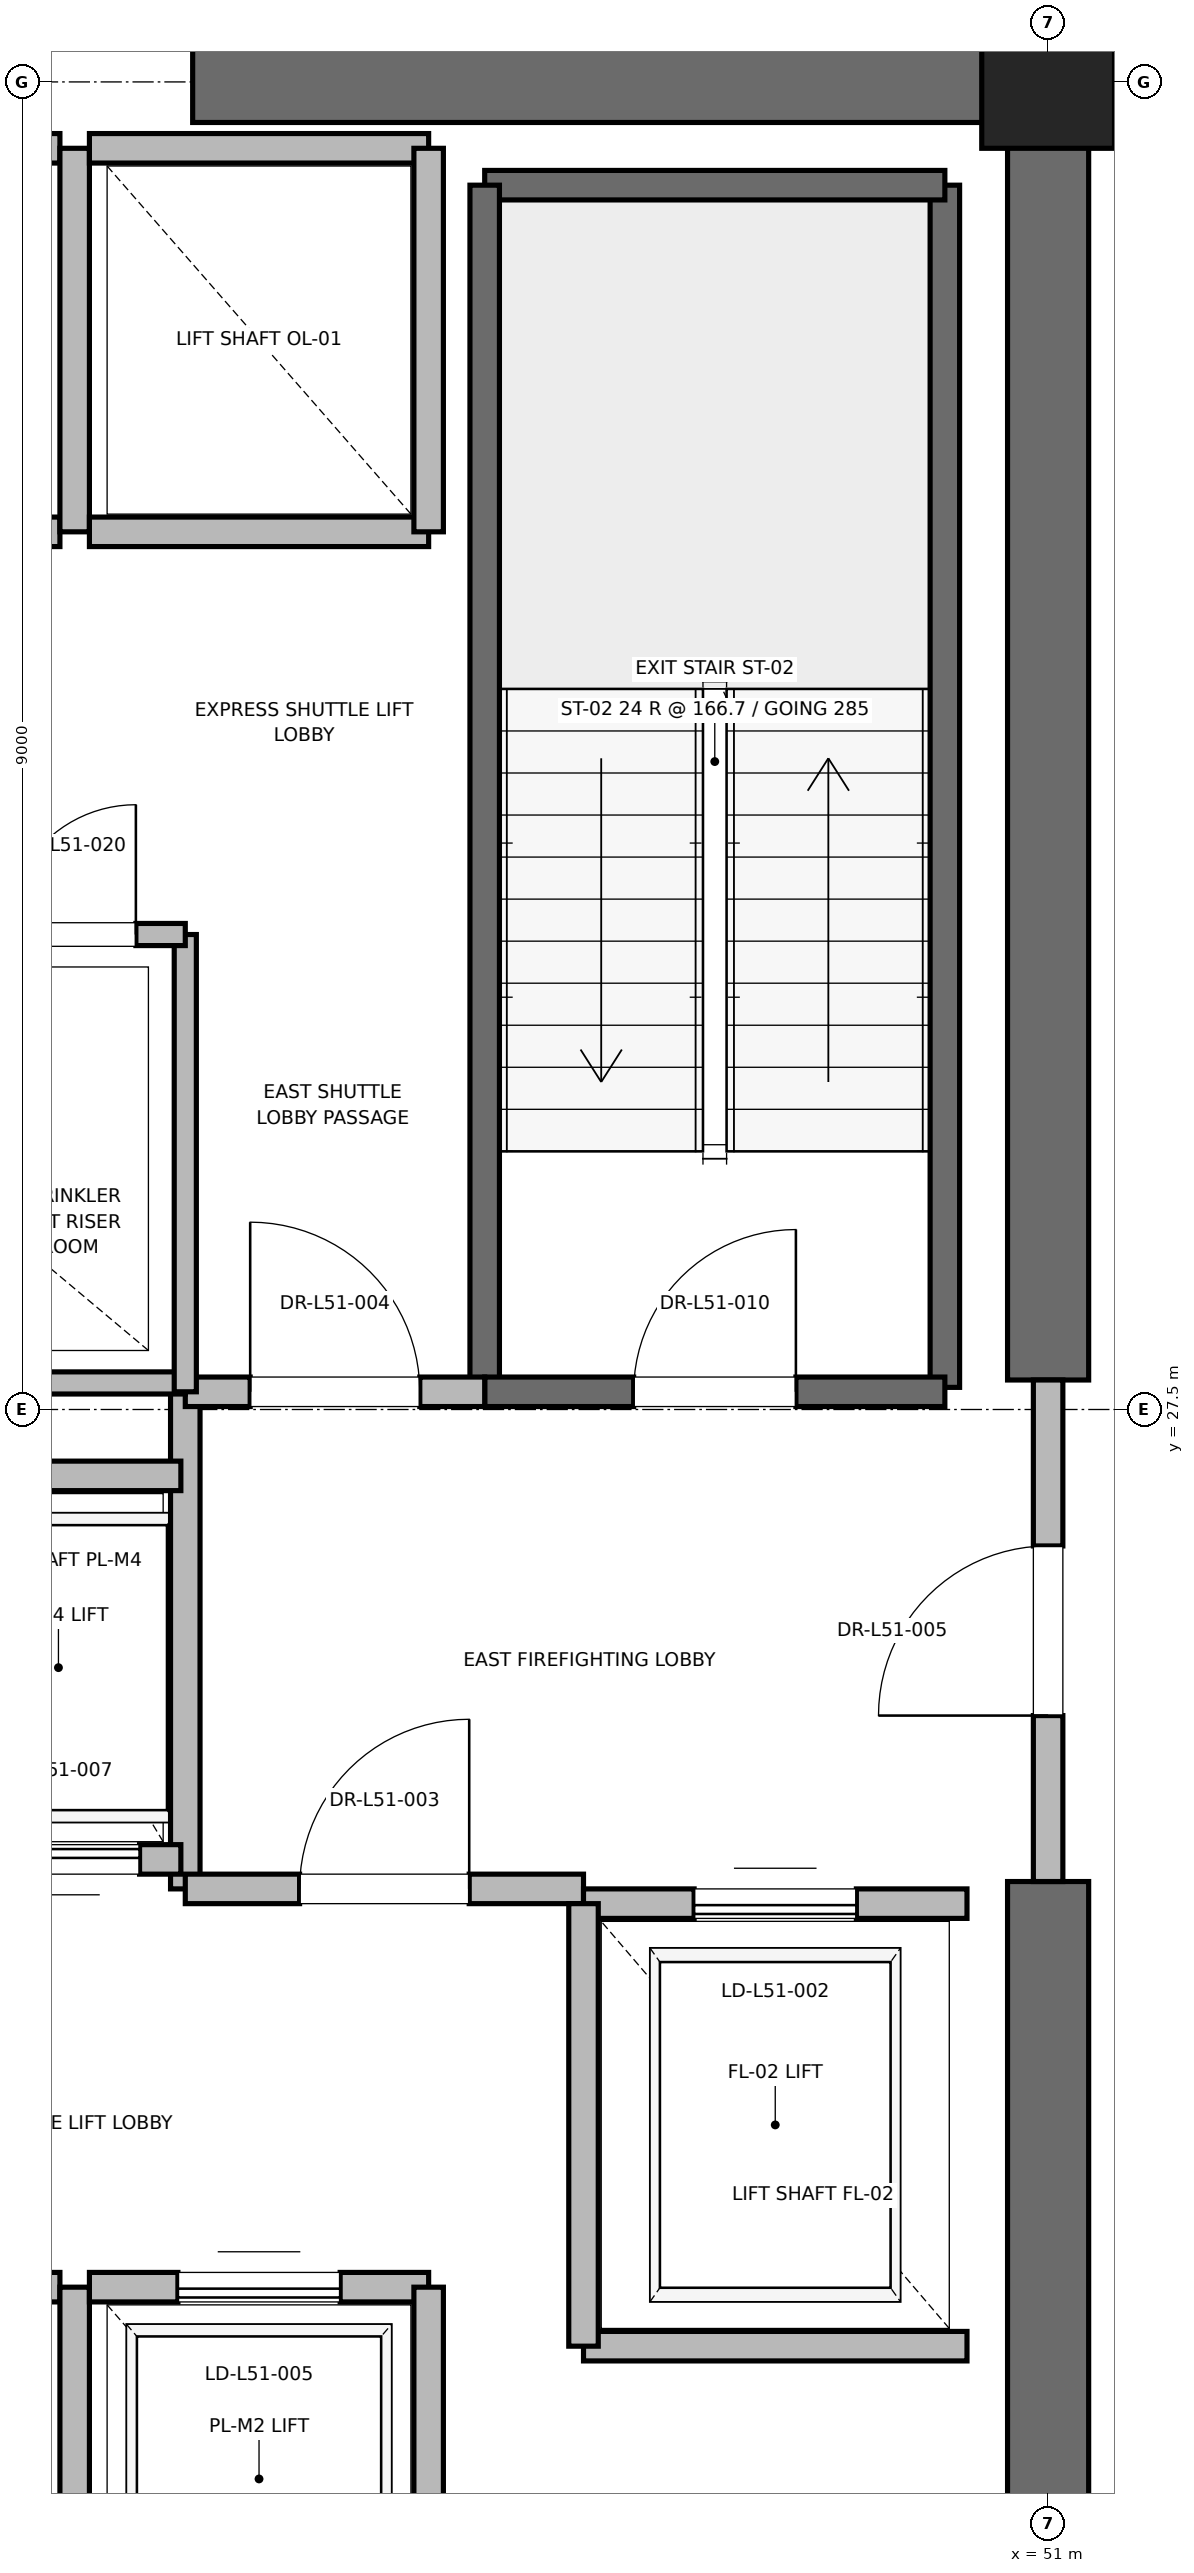
"""IFC4 building model, lengths in metres.
Left out: names, types, materials, properties, quantities, classifications, styles, units other than length and angle.
Written with IfcOpenShell. Run it as: python <this file> out.ifc"""

import sys

from ifc_helpers import new_model, si_unit, direction, frame, frame_2d, origin, origin_2d, place, context, subcontext, project, spatial, rectangle, extrude, element, fill, save


model = new_model("IFC4")
c1 = context("Model", 3, precision=1e-05, world=origin(), true_north=direction((0.0, 1.0)))
c2 = subcontext(c1, "Body", "Model", "MODEL_VIEW")
j1 = project(units=[si_unit("LENGTHUNIT", "METRE"), si_unit("PLANEANGLEUNIT", "RADIAN")], contexts=[c1])
p1 = place(None, origin())
s1 = spatial("IfcSite", under=j1, at=p1, CompositionType="ELEMENT")
p2 = place(p1, origin())
s2 = spatial("IfcBuilding", under=s1, at=p2, CompositionType="ELEMENT")
p3 = place(p2, frame((0.0, 0.0, 221.2)))
s3 = spatial("IfcBuildingStorey", under=s2, at=p3, CompositionType="ELEMENT", Elevation=221.2)
p4 = place(p3, frame((51.0, 36.5, 0.0), z_axis=(0.0, 0.0, 1.0), x_axis=(1.0, 0.0, 0.0)))
e1 = element("IfcColumn", 1, at=p4, inside=s3, PredefinedType="PILASTER", context=c2, shape_type="SweptSolid", body=[
    extrude(rectangle(XDim=0.9, YDim=0.9, at=origin_2d()), origin(), (0.0, 0.0, 1.0), 4.0),
])
for number, where, z_axis, x_axis in (
    (2, (45.2, 36.5, 0.0), (0.0, 0.0, 1.0), (1.0, 0.0, 0.0)),
    (3, (51.0, 18.5, 0.0), (0.0, 0.0, 1.0), (0.0, 1.0, 0.0)),
):
    element("IfcWall", number, at=place(p3, frame(where, z_axis=z_axis, x_axis=x_axis)), inside=s3, PredefinedType="SHEAR", context=c2, shape_type="SweptSolid", body=[
        extrude(rectangle(XDim=5.8, YDim=0.55, at=frame_2d((2.9, 0.0))), origin(), (0.0, 0.0, 1.0), 3.775),
    ])
p5 = place(p3, frame((51.0, 27.7, 0.0), z_axis=(0.0, 0.0, 1.0), x_axis=(0.0, 1.0, 0.0)))
e4 = element("IfcWall", 4, at=p5, inside=s3, PredefinedType="SHEAR", context=c2, shape_type="SweptSolid", body=[
    extrude(rectangle(XDim=8.8, YDim=0.55, at=frame_2d((4.4, 0.0))), origin(), (0.0, 0.0, 1.0), 3.775),
])
p6 = place(p3, frame((50.3, 27.65, 0.0), z_axis=(0.0, 0.0, 1.0), x_axis=(0.0, 1.0, 0.0)))
e5 = element("IfcWall", 5, at=p6, inside=s3, PredefinedType="SOLIDWALL", context=c2, shape_type="SweptSolid", body=[
    extrude(rectangle(XDim=8.15, YDim=0.2, at=frame_2d((4.075, 0.0))), origin(), (0.0, 0.0, 1.0), 3.775),
])
p7 = place(p3, frame((47.18, 35.8, 0.0), z_axis=(0.0, 0.0, 1.0), x_axis=(1.0, 0.0, 0.0)))
e6 = element("IfcWall", 6, at=p7, inside=s3, PredefinedType="SOLIDWALL", context=c2, shape_type="SweptSolid", body=[
    extrude(rectangle(XDim=3.12, YDim=0.2, at=frame_2d((1.56, 0.0))), origin(), (0.0, 0.0, 1.0), 3.775),
])
p8 = place(p3, frame((47.18, 27.62, 0.0), z_axis=(0.0, 0.0, 1.0), x_axis=(0.0, 1.0, 0.0)))
e7 = element("IfcWall", 7, at=p8, inside=s3, PredefinedType="SOLIDWALL", context=c2, shape_type="SweptSolid", body=[
    extrude(rectangle(XDim=8.18, YDim=0.2, at=frame_2d((4.09, 0.0))), origin(), (0.0, 0.0, 1.0), 3.775),
])
p9 = place(p3, frame((47.18, 27.62, 0.0), z_axis=(0.0, 0.0, 1.0), x_axis=(1.0, 0.0, 0.0)))
e8 = element("IfcWall", 8, at=p9, inside=s3, PredefinedType="SOLIDWALL", context=c2, shape_type="SweptSolid", body=[
    extrude(rectangle(XDim=3.12, YDim=0.2, at=frame_2d((1.56, 0.0))), origin(), (0.0, 0.0, 1.0), 3.775),
])
p10 = place(p9, frame((1.01, 0.0, 0.0)))
e9 = element("IfcOpeningElement", 9, at=p10, cuts=e8, PredefinedType="OPENING", context=c2, shape_type="SweptSolid", body=[
    extrude(rectangle(XDim=1.1, YDim=2.15, at=frame_2d((0.55, 1.075))), frame((0.0, 0.1, 0.0), z_axis=(0.0, -1.0, 0.0), x_axis=(1.0, 0.0, 0.0)), (0.0, 0.0, 1.0), 0.2),
])
p11 = place(p3, frame((45.15, 24.25, 0.0), z_axis=(0.0, 0.0, 1.0), x_axis=(0.0, 1.0, 0.0)))
e10 = element("IfcWall", 10, at=p11, inside=s3, PredefinedType="PARTITIONING", context=c2, shape_type="SweptSolid", body=[
    extrude(rectangle(XDim=3.37, YDim=0.2, at=frame_2d((1.685, 0.0))), origin(), (0.0, 0.0, 1.0), 3.775),
])
p12 = place(p3, frame((45.15, 24.25, 0.0), z_axis=(0.0, 0.0, 1.0), x_axis=(1.0, 0.0, 0.0)))
e11 = element("IfcWall", 11, at=p12, inside=s3, PredefinedType="PARTITIONING", context=c2, shape_type="SweptSolid", body=[
    extrude(rectangle(XDim=2.7, YDim=0.2, at=frame_2d((1.35, 0.0))), origin(), (0.0, 0.0, 1.0), 3.775),
])
p13 = place(p12, frame((0.775, 0.0, 0.0)))
e12 = element("IfcOpeningElement", 12, at=p13, cuts=e11, PredefinedType="OPENING", context=c2, shape_type="SweptSolid", body=[
    extrude(rectangle(XDim=1.15, YDim=2.2, at=frame_2d((0.575, 1.1))), frame((0.0, 0.1, 0.0), z_axis=(0.0, -1.0, 0.0), x_axis=(1.0, 0.0, 0.0)), (0.0, 0.0, 1.0), 0.2),
])
p14 = place(p3, frame((45.15, 27.62, 0.0), z_axis=(0.0, 0.0, 1.0), x_axis=(1.0, 0.0, 0.0)))
e13 = element("IfcWall", 13, at=p14, inside=s3, PredefinedType="PARTITIONING", context=c2, shape_type="SweptSolid", body=[
    extrude(rectangle(XDim=2.03, YDim=0.2, at=frame_2d((1.015, 0.0))), origin(), (0.0, 0.0, 1.0), 3.775),
])
p15 = place(p14, frame((0.44, 0.0, 0.0)))
e14 = element("IfcOpeningElement", 14, at=p15, cuts=e13, PredefinedType="OPENING", context=c2, shape_type="SweptSolid", body=[
    extrude(rectangle(XDim=1.15, YDim=2.2, at=frame_2d((0.575, 1.1))), frame((0.0, 0.1, 0.0), z_axis=(0.0, -1.0, 0.0), x_axis=(1.0, 0.0, 0.0)), (0.0, 0.0, 1.0), 0.2),
])
p16 = place(p3, frame((51.0, 24.3, 0.0), z_axis=(0.0, 0.0, 1.0), x_axis=(0.0, 1.0, 0.0)))
e15 = element("IfcWall", 15, at=p16, inside=s3, PredefinedType="PARTITIONING", context=c2, shape_type="SweptSolid", body=[
    extrude(rectangle(XDim=3.4, YDim=0.2, at=frame_2d((1.7, 0.0))), origin(), (0.0, 0.0, 1.0), 2.755),
])
p17 = place(p16, frame((1.125, 0.0, 0.0)))
e16 = element("IfcOpeningElement", 16, at=p17, cuts=e15, PredefinedType="OPENING", context=c2, shape_type="SweptSolid", body=[
    extrude(rectangle(XDim=1.15, YDim=2.2, at=frame_2d((0.575, 1.1))), frame((0.0, 0.1, 0.0), z_axis=(0.0, -1.0, 0.0), x_axis=(1.0, 0.0, 0.0)), (0.0, 0.0, 1.0), 0.2),
])
p18 = place(p3, frame((47.85, 21.15, 0.0), z_axis=(0.0, 0.0, 1.0), x_axis=(1.0, 0.0, 0.0)))
e17 = element("IfcWall", 17, at=p18, inside=s3, PredefinedType="SOLIDWALL", context=c2, shape_type="SweptSolid", body=[
    extrude(rectangle(XDim=2.6, YDim=0.2, at=frame_2d((1.3, 0.0))), origin(), (0.0, 0.0, 1.0), 3.775),
])
p19 = place(p3, frame((50.45, 24.15, 0.0), z_axis=(0.0, 0.0, 1.0), x_axis=(-1.0, 0.0, 0.0)))
e18 = element("IfcWall", 18, at=p19, inside=s3, PredefinedType="SOLIDWALL", context=c2, shape_type="SweptSolid", body=[
    extrude(rectangle(XDim=2.6, YDim=0.2, at=frame_2d((1.3, 0.0))), origin(), (0.0, 0.0, 1.0), 2.755),
])
p20 = place(p19, frame((0.75, 0.0, 0.0)))
e19 = element("IfcOpeningElement", 19, at=p20, cuts=e18, PredefinedType="OPENING", context=c2, shape_type="SweptSolid", body=[
    extrude(rectangle(XDim=1.1, YDim=2.2, at=frame_2d((0.55, 1.1))), frame((0.0, 0.1, 0.0), z_axis=(0.0, -1.0, 0.0), x_axis=(1.0, 0.0, 0.0)), (0.0, 0.0, 1.0), 0.2),
])
p21 = place(p3, frame((47.85, 24.15, 0.0), z_axis=(0.0, 0.0, 1.0), x_axis=(0.0, -1.0, 0.0)))
e20 = element("IfcWall", 20, at=p21, inside=s3, PredefinedType="SOLIDWALL", context=c2, shape_type="SweptSolid", body=[
    extrude(rectangle(XDim=3.0, YDim=0.2, at=frame_2d((1.5, 0.0))), origin(), (0.0, 0.0, 1.0), 3.775),
])
p22 = place(p3, frame((44.3, 21.55, 0.0), z_axis=(0.0, 0.0, 1.0), x_axis=(-1.0, 0.0, 0.0)))
e21 = element("IfcWall", 21, at=p22, inside=s3, PredefinedType="SOLIDWALL", context=c2, shape_type="SweptSolid", body=[
    extrude(rectangle(XDim=2.3, YDim=0.2, at=frame_2d((1.15, 0.0))), origin(), (0.0, 0.0, 1.0), 3.775),
])
p23 = place(p22, frame((0.6, 0.0, 0.0)))
e22 = element("IfcOpeningElement", 22, at=p23, cuts=e21, PredefinedType="OPENING", context=c2, shape_type="SweptSolid", body=[
    extrude(rectangle(XDim=1.1, YDim=2.2, at=frame_2d((0.55, 1.1))), frame((0.0, 0.1, 0.0), z_axis=(0.0, -1.0, 0.0), x_axis=(1.0, 0.0, 0.0)), (0.0, 0.0, 1.0), 0.2),
])
p24 = place(p3, frame((44.4, 18.95, 0.0), z_axis=(0.0, 0.0, 1.0), x_axis=(0.0, 1.0, 0.0)))
e23 = element("IfcWall", 23, at=p24, inside=s3, PredefinedType="SOLIDWALL", context=c2, shape_type="SweptSolid", body=[
    extrude(rectangle(XDim=2.6, YDim=0.2, at=frame_2d((1.3, 0.0))), origin(), (0.0, 0.0, 1.0), 3.775),
])
p25 = place(p3, frame((46.8, 21.55, 0.0), z_axis=(0.0, 0.0, 1.0), x_axis=(-1.0, 0.0, 0.0)))
e24 = element("IfcWall", 24, at=p25, inside=s3, PredefinedType="SOLIDWALL", context=c2, shape_type="SweptSolid", body=[
    extrude(rectangle(XDim=2.3, YDim=0.2, at=frame_2d((1.15, 0.0))), origin(), (0.0, 0.0, 1.0), 3.775),
])
p26 = place(p25, frame((0.6, 0.0, 0.0)))
e25 = element("IfcOpeningElement", 25, at=p26, cuts=e24, PredefinedType="OPENING", context=c2, shape_type="SweptSolid", body=[
    extrude(rectangle(XDim=1.1, YDim=2.2, at=frame_2d((0.55, 1.1))), frame((0.0, 0.1, 0.0), z_axis=(0.0, -1.0, 0.0), x_axis=(1.0, 0.0, 0.0)), (0.0, 0.0, 1.0), 0.2),
])
p27 = place(p3, frame((46.8, 18.95, 0.0), z_axis=(0.0, 0.0, 1.0), x_axis=(0.0, 1.0, 0.0)))
e26 = element("IfcWall", 26, at=p27, inside=s3, PredefinedType="SOLIDWALL", context=c2, shape_type="SweptSolid", body=[
    extrude(rectangle(XDim=2.6, YDim=0.2, at=frame_2d((1.3, 0.0))), origin(), (0.0, 0.0, 1.0), 3.775),
])
p28 = place(p3, frame((43.46, 24.45, 0.0), z_axis=(0.0, 0.0, 1.0), x_axis=(1.0, 0.0, 0.0)))
e27 = element("IfcWall", 27, at=p28, inside=s3, PredefinedType="SOLIDWALL", context=c2, shape_type="SweptSolid", body=[
    extrude(rectangle(XDim=1.66, YDim=0.2, at=frame_2d((0.83, 0.0))), origin(), (0.0, 0.0, 1.0), 3.775),
])
p29 = place(p28, frame((0.28, 0.0, 0.0)))
e28 = element("IfcOpeningElement", 28, at=p29, cuts=e27, PredefinedType="OPENING", context=c2, shape_type="SweptSolid", body=[
    extrude(rectangle(XDim=1.1, YDim=2.2, at=frame_2d((0.55, 1.1))), frame((0.0, 0.1, 0.0), z_axis=(0.0, -1.0, 0.0), x_axis=(1.0, 0.0, 0.0)), (0.0, 0.0, 1.0), 0.2),
])
p30 = place(p3, frame((45.12, 27.05, 0.0), z_axis=(0.0, 0.0, 1.0), x_axis=(-1.0, 0.0, 0.0)))
e29 = element("IfcWall", 29, at=p30, inside=s3, PredefinedType="SOLIDWALL", context=c2, shape_type="SweptSolid", body=[
    extrude(rectangle(XDim=1.66, YDim=0.2, at=frame_2d((0.83, 0.0))), origin(), (0.0, 0.0, 1.0), 3.775),
])
p31 = place(p3, frame((42.0, 33.45, 0.0), z_axis=(0.0, 0.0, 1.0), x_axis=(1.0, 0.0, 0.0)))
e30 = element("IfcWall", 30, at=p31, inside=s3, PredefinedType="SOLIDWALL", context=c2, shape_type="SweptSolid", body=[
    extrude(rectangle(XDim=2.3, YDim=0.2, at=frame_2d((1.15, 0.0))), origin(), (0.0, 0.0, 1.0), 3.775),
])
p32 = place(p3, frame((44.3, 36.05, 0.0), z_axis=(0.0, 0.0, 1.0), x_axis=(-1.0, 0.0, 0.0)))
e31 = element("IfcWall", 31, at=p32, inside=s3, PredefinedType="SOLIDWALL", context=c2, shape_type="SweptSolid", body=[
    extrude(rectangle(XDim=2.3, YDim=0.2, at=frame_2d((1.15, 0.0))), origin(), (0.0, 0.0, 1.0), 2.755),
])
p33 = place(p3, frame((44.4, 33.45, 0.0), z_axis=(0.0, 0.0, 1.0), x_axis=(0.0, 1.0, 0.0)))
e32 = element("IfcWall", 32, at=p33, inside=s3, PredefinedType="SOLIDWALL", context=c2, shape_type="SweptSolid", body=[
    extrude(rectangle(XDim=2.6, YDim=0.2, at=frame_2d((1.3, 0.0))), origin(), (0.0, 0.0, 1.0), 2.755),
])
p34 = place(p3, frame((44.5, 33.45, 0.0), z_axis=(0.0, 0.0, 1.0), x_axis=(1.0, 0.0, 0.0)))
e33 = element("IfcWall", 33, at=p34, inside=s3, PredefinedType="SOLIDWALL", context=c2, shape_type="SweptSolid", body=[
    extrude(rectangle(XDim=2.3, YDim=0.2, at=frame_2d((1.15, 0.0))), origin(), (0.0, 0.0, 1.0), 3.775),
])
p35 = place(p3, frame((46.8, 36.05, 0.0), z_axis=(0.0, 0.0, 1.0), x_axis=(-1.0, 0.0, 0.0)))
e34 = element("IfcWall", 34, at=p35, inside=s3, PredefinedType="SOLIDWALL", context=c2, shape_type="SweptSolid", body=[
    extrude(rectangle(XDim=2.3, YDim=0.2, at=frame_2d((1.15, 0.0))), origin(), (0.0, 0.0, 1.0), 2.755),
])
p36 = place(p3, frame((46.8, 33.45, 0.0), z_axis=(0.0, 0.0, 1.0), x_axis=(0.0, 1.0, 0.0)))
e35 = element("IfcWall", 35, at=p36, inside=s3, PredefinedType="SOLIDWALL", context=c2, shape_type="SweptSolid", body=[
    extrude(rectangle(XDim=2.6, YDim=0.2, at=frame_2d((1.3, 0.0))), origin(), (0.0, 0.0, 1.0), 3.775),
])
p37 = place(p3, frame((41.56, 27.68, 0.0), z_axis=(0.0, 0.0, 1.0), x_axis=(1.0, 0.0, 0.0)))
e36 = element("IfcWall", 36, at=p37, inside=s3, PredefinedType="PARTITIONING", context=c2, shape_type="SweptSolid", body=[
    extrude(rectangle(XDim=3.59, YDim=0.15, at=frame_2d((1.795, 0.0))), origin(), (0.0, 0.0, 1.0), 2.85),
])
p38 = place(p3, frame((45.15, 27.62, 0.0), z_axis=(0.0, 0.0, 1.0), x_axis=(0.0, 1.0, 0.0)))
e37 = element("IfcWall", 37, at=p38, inside=s3, PredefinedType="PARTITIONING", context=c2, shape_type="SweptSolid", body=[
    extrude(rectangle(XDim=3.1, YDim=0.15, at=frame_2d((1.55, 0.0))), origin(), (0.0, 0.0, 1.0), 2.85),
])
p39 = place(p3, frame((43.6, 30.72, 0.0), z_axis=(0.0, 0.0, 1.0), x_axis=(1.0, 0.0, 0.0)))
e38 = element("IfcWall", 38, at=p39, inside=s3, PredefinedType="PARTITIONING", context=c2, shape_type="SweptSolid", body=[
    extrude(rectangle(XDim=1.55, YDim=0.15, at=frame_2d((0.775, 0.0))), origin(), (0.0, 0.0, 1.0), 2.85),
])
p40 = place(p39, frame((0.335, 0.0, 0.0)))
e39 = element("IfcOpeningElement", 39, at=p40, cuts=e38, PredefinedType="OPENING", context=c2, shape_type="SweptSolid", body=[
    extrude(rectangle(XDim=0.88, YDim=2.1, at=frame_2d((0.44, 1.05))), frame((0.0, 0.075, 0.0), z_axis=(0.0, -1.0, 0.0), x_axis=(1.0, 0.0, 0.0)), (0.0, 0.0, 1.0), 0.15),
])
p41 = place(p10, origin())
e40 = element("IfcDoor", 40, at=p41, inside=s3, OperationType="SINGLE_SWING_RIGHT", PredefinedType="DOOR", context=c2, shape_type="SweptSolid", body=[
    extrude(rectangle(XDim=1.1, YDim=2.15, at=frame_2d((0.55, 1.075))), frame((0.0, 0.025, 0.0), z_axis=(0.0, -1.0, 0.0), x_axis=(1.0, 0.0, 0.0)), (0.0, 0.0, 1.0), 0.05),
])
fill(e9, e40)
p42 = place(p13, origin())
e41 = element("IfcDoor", 41, at=p42, inside=s3, OperationType="SINGLE_SWING_RIGHT", PredefinedType="DOOR", context=c2, shape_type="SweptSolid", body=[
    extrude(rectangle(XDim=1.15, YDim=2.2, at=frame_2d((0.575, 1.1))), frame((0.0, 0.025, 0.0), z_axis=(0.0, -1.0, 0.0), x_axis=(1.0, 0.0, 0.0)), (0.0, 0.0, 1.0), 0.05),
])
fill(e12, e41)
p43 = place(p15, origin())
e42 = element("IfcDoor", 42, at=p43, inside=s3, OperationType="SINGLE_SWING_LEFT", PredefinedType="DOOR", context=c2, shape_type="SweptSolid", body=[
    extrude(rectangle(XDim=1.15, YDim=2.2, at=frame_2d((0.575, 1.1))), frame((0.0, 0.025, 0.0), z_axis=(0.0, -1.0, 0.0), x_axis=(1.0, 0.0, 0.0)), (0.0, 0.0, 1.0), 0.05),
])
fill(e14, e42)
p44 = place(p17, origin())
e43 = element("IfcDoor", 43, at=p44, inside=s3, OperationType="SINGLE_SWING_LEFT", PredefinedType="DOOR", context=c2, shape_type="SweptSolid", body=[
    extrude(rectangle(XDim=1.15, YDim=2.2, at=frame_2d((0.575, 1.1))), frame((0.0, 0.025, 0.0), z_axis=(0.0, -1.0, 0.0), x_axis=(1.0, 0.0, 0.0)), (0.0, 0.0, 1.0), 0.05),
])
fill(e16, e43)
p45 = place(p20, origin())
e44 = element("IfcDoor", 44, at=p45, inside=s3, OperationType="SLIDING_TO_RIGHT", PredefinedType="DOOR", context=c2, shape_type="SweptSolid", body=[
    extrude(rectangle(XDim=1.1, YDim=2.2, at=frame_2d((0.55, 1.1))), frame((0.0, 0.025, 0.0), z_axis=(0.0, -1.0, 0.0), x_axis=(1.0, 0.0, 0.0)), (0.0, 0.0, 1.0), 0.05),
])
fill(e19, e44)
p46 = place(p26, origin())
e45 = element("IfcDoor", 45, at=p46, inside=s3, OperationType="SLIDING_TO_RIGHT", PredefinedType="DOOR", context=c2, shape_type="SweptSolid", body=[
    extrude(rectangle(XDim=1.1, YDim=2.2, at=frame_2d((0.55, 1.1))), frame((0.0, 0.025, 0.0), z_axis=(0.0, -1.0, 0.0), x_axis=(1.0, 0.0, 0.0)), (0.0, 0.0, 1.0), 0.05),
])
fill(e25, e45)
p47 = place(p29, origin())
e46 = element("IfcDoor", 46, at=p47, inside=s3, OperationType="SLIDING_TO_RIGHT", PredefinedType="DOOR", context=c2, shape_type="SweptSolid", body=[
    extrude(rectangle(XDim=1.1, YDim=2.2, at=frame_2d((0.55, 1.1))), frame((0.0, 0.025, 0.0), z_axis=(0.0, -1.0, 0.0), x_axis=(1.0, 0.0, 0.0)), (0.0, 0.0, 1.0), 0.05),
])
fill(e28, e46)
p48 = place(p40, origin())
e47 = element("IfcDoor", 47, at=p48, inside=s3, OperationType="SINGLE_SWING_RIGHT", PredefinedType="DOOR", context=c2, shape_type="SweptSolid", body=[
    extrude(rectangle(XDim=0.88, YDim=2.1, at=frame_2d((0.44, 1.05))), frame((0.0, 0.025, 0.0), z_axis=(0.0, -1.0, 0.0), x_axis=(1.0, 0.0, 0.0)), (0.0, 0.0, 1.0), 0.05),
])
fill(e39, e47)
save(model, sys.argv[1])
